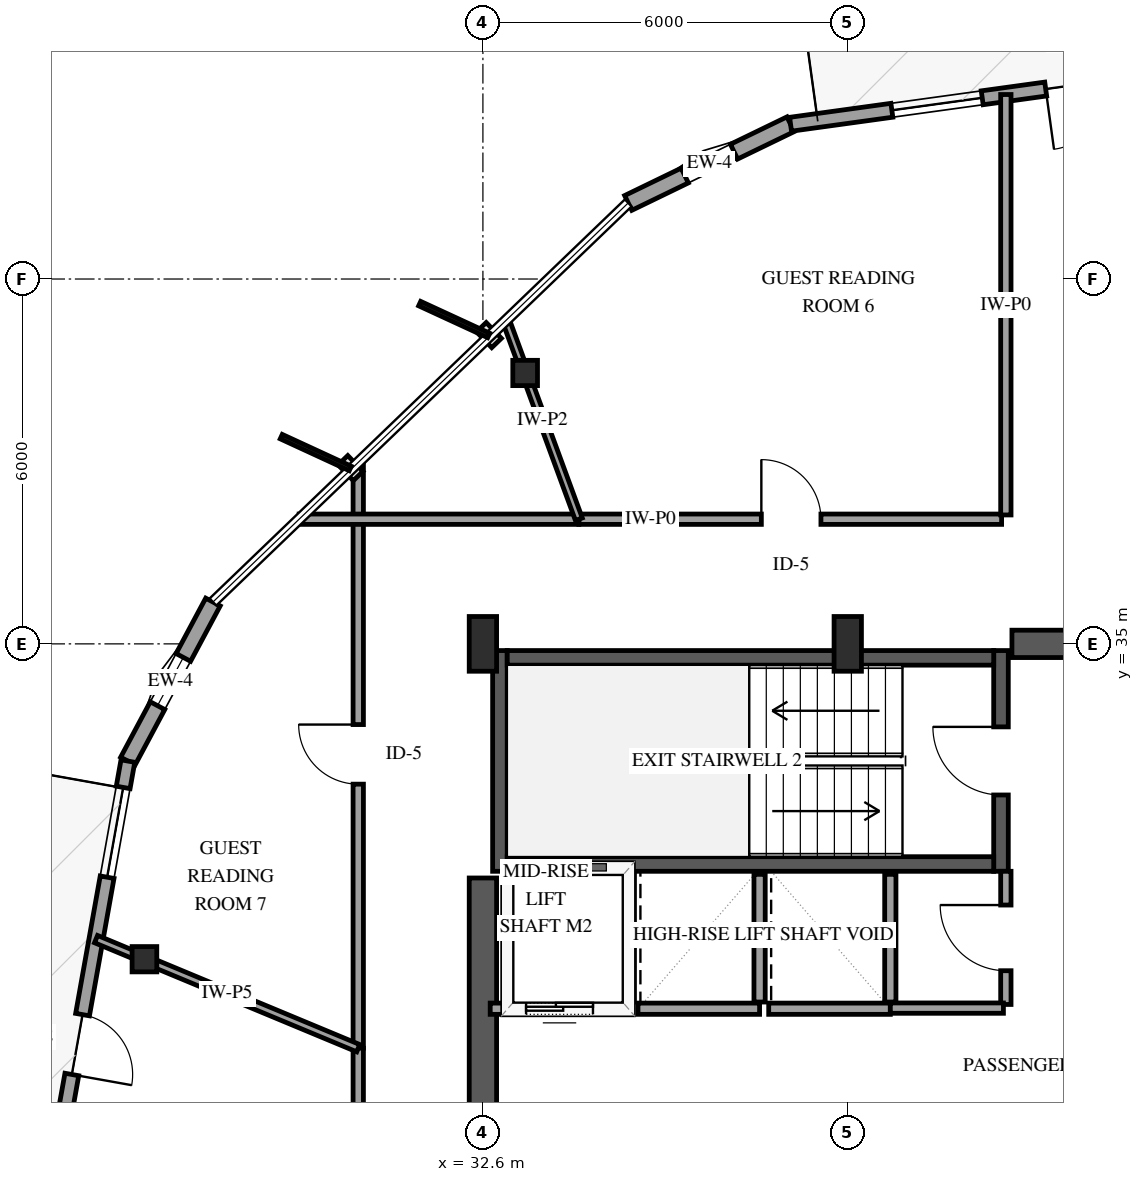
"""IFC4 building model, lengths in metres.
Left out: names, types, materials, properties, quantities, classifications, styles, units other than length and angle.
Written with IfcOpenShell. Run it as: python <this file> out.ifc"""

import sys

from ifc_helpers import new_model, si_unit, direction, frame, frame_2d, origin, origin_2d, place, context, subcontext, project, spatial, rectangle, i_section, extrude, element, fill, save


model = new_model("IFC4")
c1 = context("Model", 3, precision=1e-05, world=origin(), true_north=direction((0.0, 1.0)))
c2 = subcontext(c1, "Body", "Model", "MODEL_VIEW")
j1 = project(units=[si_unit("LENGTHUNIT", "METRE"), si_unit("PLANEANGLEUNIT", "RADIAN")], contexts=[c1])
p1 = place(None, origin())
s1 = spatial("IfcSite", under=j1, at=p1, CompositionType="ELEMENT")
p2 = place(p1, origin())
s2 = spatial("IfcBuilding", under=s1, at=p2, CompositionType="ELEMENT")
p3 = place(p2, frame((0.0, 0.0, 194.2)))
s3 = spatial("IfcBuildingStorey", under=s2, at=p3, CompositionType="ELEMENT", Elevation=194.2)
p4 = place(p3, frame((32.88, 31.26, 0.0), z_axis=(0.0, 0.0, 1.0), x_axis=(0.0, 1.0, 0.0)))
e1 = element("IfcWall", 1, at=p4, inside=s3, PredefinedType="SHEAR", context=c2, shape_type="SweptSolid", body=[
    extrude(rectangle(XDim=3.63, YDim=0.24, at=frame_2d((1.815, 0.0))), origin(), (0.0, 0.0, 1.0), 3.6),
])
p5 = place(p3, frame((41.12, 31.26, 0.0), z_axis=(0.0, 0.0, 1.0), x_axis=(0.0, 1.0, 0.0)))
e2 = element("IfcWall", 2, at=p5, inside=s3, PredefinedType="SHEAR", context=c2, shape_type="SweptSolid", body=[
    extrude(rectangle(XDim=3.63, YDim=0.24, at=frame_2d((1.815, 0.0))), origin(), (0.0, 0.0, 1.0), 3.6),
])
p6 = place(p5, frame((1.255, 0.0, 0.0)))
e3 = element("IfcOpeningElement", 3, at=p6, cuts=e2, PredefinedType="OPENING", context=c2, shape_type="SweptSolid", body=[
    extrude(rectangle(XDim=1.12, YDim=2.15, at=frame_2d((0.56, 1.075))), frame((0.0, 0.13, 0.0), z_axis=(0.0, -1.0, 0.0), x_axis=(1.0, 0.0, 0.0)), (0.0, 0.0, 1.0), 0.26),
])
for number, where, z_axis, x_axis in (
    (4, (33.0, 31.38, 0.0), (0.0, 0.0, 1.0), (1.0, 0.0, 0.0)),
    (5, (33.0, 34.77, 0.0), (0.0, 0.0, 1.0), (1.0, 0.0, 0.0)),
):
    element("IfcWall", number, at=place(p3, frame(where, z_axis=z_axis, x_axis=x_axis)), inside=s3, PredefinedType="SHEAR", context=c2, shape_type="SweptSolid", body=[
        extrude(rectangle(XDim=8.0, YDim=0.24, at=frame_2d((4.0, 0.0))), origin(), (0.0, 0.0, 1.0), 3.6),
    ])
p7 = place(p3, frame((32.6, 18.85, 0.0), z_axis=(0.0, 0.0, 1.0), x_axis=(0.0, 1.0, 0.0)))
e6 = element("IfcWall", 6, at=p7, inside=s3, PredefinedType="SHEAR", context=c2, shape_type="SweptSolid", body=[
    extrude(rectangle(XDim=12.3, YDim=0.45, at=frame_2d((6.15, 0.0))), origin(), (0.0, 0.0, 1.0), 3.6),
])
p8 = place(p3, frame((41.3, 35.0, 0.0), z_axis=(0.0, 0.0, 1.0), x_axis=(1.0, 0.0, 0.0)))
e7 = element("IfcWall", 7, at=p8, inside=s3, PredefinedType="SHEAR", context=c2, shape_type="SweptSolid", body=[
    extrude(rectangle(XDim=2.85, YDim=0.45, at=frame_2d((1.425, 0.0))), origin(), (0.0, 0.0, 1.0), 3.6),
])
for number, where, z_axis, x_axis in (
    (8, (32.6, 35.0, 0.0), (0.0, 0.0, 1.0), (1.0, 0.0, 0.0)),
    (9, (38.6, 35.0, 0.0), (0.0, 0.0, 1.0), (1.0, 0.0, 0.0)),
):
    element("IfcColumn", number, at=place(p3, frame(where, z_axis=z_axis, x_axis=x_axis)), inside=s3, PredefinedType="PILASTER", context=c2, shape_type="SweptSolid", body=[
        extrude(rectangle(XDim=0.45, YDim=0.9, at=origin_2d()), origin(), (0.0, 0.0, 1.0), 3.6),
    ])
for number, where, z_axis, x_axis in (
    (10, (33.295, 39.455, 0.0), (0.0, 0.0, 1.0), (1.0, 0.0, 0.0)),
    (11, (27.034, 29.814, 0.0), (0.0, 0.0, 1.0), (1.0, 0.0, 0.0)),
):
    element("IfcColumn", number, at=place(p3, frame(where, z_axis=z_axis, x_axis=x_axis)), inside=s3, PredefinedType="COLUMN", context=c2, shape_type="SweptSolid", body=[
        extrude(i_section(OverallWidth=0.406, OverallDepth=0.416, WebThickness=0.03, FlangeThickness=0.048, FilletRadius=0.038, at=origin_2d()), origin(), (0.0, 0.0, 1.0), 3.6),
    ])
p9 = place(p3, frame((37.659, 43.545, 0.0), z_axis=(0.0, 0.0, 1.0), x_axis=(-0.899889481121, -0.436118013578, 0.0)))
e12 = element("IfcWall", 12, at=p9, inside=s3, PredefinedType="SOLIDWALL", context=c2, shape_type="SweptSolid", body=[
    extrude(rectangle(XDim=2.966, YDim=0.27, at=frame_2d((1.483, 0.0))), origin(), (0.0, 0.0, 1.0), 2.679),
])
p10 = place(p9, frame((1.033, 0.0, 0.75)))
e13 = element("IfcOpeningElement", 13, at=p10, cuts=e12, PredefinedType="OPENING", context=c2, shape_type="SweptSolid", body=[
    extrude(rectangle(XDim=0.9, YDim=1.5, at=frame_2d((0.45, 0.75))), frame((0.0, 0.145, 0.0), z_axis=(0.0, -1.0, 0.0), x_axis=(1.0, 0.0, 0.0)), (0.0, 0.0, 1.0), 0.29),
])
p11 = place(p3, frame((47.042, 44.84, 0.0), z_axis=(0.0, 0.0, 1.0), x_axis=(-0.990605602179, -0.136749921142, 0.0)))
e14 = element("IfcWall", 14, at=p11, inside=s3, PredefinedType="SOLIDWALL", context=c2, shape_type="SweptSolid", body=[
    extrude(rectangle(XDim=9.471, YDim=0.23, at=frame_2d((4.735, 0.0))), origin(), (0.0, 0.0, 1.0), 2.679),
])
p12 = place(p11, frame((4.236, 0.0, 0.0)))
e15 = element("IfcOpeningElement", 15, at=p12, cuts=e14, PredefinedType="OPENING", context=c2, shape_type="SweptSolid", body=[
    extrude(rectangle(XDim=1.0, YDim=2.15, at=frame_2d((0.5, 1.075))), frame((0.0, 0.125, 0.0), z_axis=(0.0, -1.0, 0.0), x_axis=(1.0, 0.0, 0.0)), (0.0, 0.0, 1.0), 0.25),
])
p13 = place(p11, frame((0.44, 0.0, 0.72)))
e16 = element("IfcOpeningElement", 16, at=p13, cuts=e14, PredefinedType="OPENING", context=c2, shape_type="SweptSolid", body=[
    extrude(rectangle(XDim=1.5, YDim=1.7, at=frame_2d((0.75, 0.85))), frame((0.0, 0.125, 0.0), z_axis=(0.0, -1.0, 0.0), x_axis=(1.0, 0.0, 0.0)), (0.0, 0.0, 1.0), 0.25),
])
p14 = place(p11, frame((6.29, 0.0, 0.72)))
e17 = element("IfcOpeningElement", 17, at=p14, cuts=e14, PredefinedType="OPENING", context=c2, shape_type="SweptSolid", body=[
    extrude(rectangle(XDim=1.5, YDim=1.7, at=frame_2d((0.75, 0.85))), frame((0.0, 0.125, 0.0), z_axis=(0.0, -1.0, 0.0), x_axis=(1.0, 0.0, 0.0)), (0.0, 0.0, 1.0), 0.25),
])
p15 = place(p3, frame((28.161, 35.688, 0.0), z_axis=(0.0, 0.0, 1.0), x_axis=(-0.471634393059, -0.88179419327, 0.0)))
e18 = element("IfcWall", 18, at=p15, inside=s3, PredefinedType="SOLIDWALL", context=c2, shape_type="SweptSolid", body=[
    extrude(rectangle(XDim=2.967, YDim=0.27, at=frame_2d((1.483, 0.0))), origin(), (0.0, 0.0, 1.0), 2.679),
])
p16 = place(p15, frame((1.033, 0.0, 0.75)))
e19 = element("IfcOpeningElement", 19, at=p16, cuts=e18, PredefinedType="OPENING", context=c2, shape_type="SweptSolid", body=[
    extrude(rectangle(XDim=0.9, YDim=1.5, at=frame_2d((0.45, 0.75))), frame((0.0, 0.145, 0.0), z_axis=(0.0, -1.0, 0.0), x_axis=(1.0, 0.0, 0.0)), (0.0, 0.0, 1.0), 0.29),
])
p17 = place(p3, frame((26.762, 33.073, 0.0), z_axis=(0.0, 0.0, 1.0), x_axis=(-0.176062749049, -0.984378945527, 0.0)))
e20 = element("IfcWall", 20, at=p17, inside=s3, PredefinedType="SOLIDWALL", context=c2, shape_type="SweptSolid", body=[
    extrude(rectangle(XDim=9.471, YDim=0.23, at=frame_2d((4.735, 0.0))), origin(), (0.0, 0.0, 1.0), 2.679),
])
p18 = place(p17, frame((4.236, 0.0, 0.0)))
e21 = element("IfcOpeningElement", 21, at=p18, cuts=e20, PredefinedType="OPENING", context=c2, shape_type="SweptSolid", body=[
    extrude(rectangle(XDim=1.0, YDim=2.15, at=frame_2d((0.5, 1.075))), frame((0.0, 0.125, 0.0), z_axis=(0.0, -1.0, 0.0), x_axis=(1.0, 0.0, 0.0)), (0.0, 0.0, 1.0), 0.25),
])
p19 = place(p17, frame((0.44, 0.0, 0.72)))
e22 = element("IfcOpeningElement", 22, at=p19, cuts=e20, PredefinedType="OPENING", context=c2, shape_type="SweptSolid", body=[
    extrude(rectangle(XDim=1.5, YDim=1.7, at=frame_2d((0.75, 0.85))), frame((0.0, 0.125, 0.0), z_axis=(0.0, -1.0, 0.0), x_axis=(1.0, 0.0, 0.0)), (0.0, 0.0, 1.0), 0.25),
])
p20 = place(p17, frame((5.875, 0.0, 0.72)))
e23 = element("IfcOpeningElement", 23, at=p20, cuts=e20, PredefinedType="OPENING", context=c2, shape_type="SweptSolid", body=[
    extrude(rectangle(XDim=1.5, YDim=1.7, at=frame_2d((0.75, 0.85))), frame((0.0, 0.125, 0.0), z_axis=(0.0, -1.0, 0.0), x_axis=(1.0, 0.0, 0.0)), (0.0, 0.0, 1.0), 0.25),
])
p21 = place(p3, frame((32.72, 29.0, 0.0), z_axis=(0.0, 0.0, 1.0), x_axis=(1.0, 0.0, 0.0)))
e24 = element("IfcWall", 24, at=p21, inside=s3, PredefinedType="SOLIDWALL", context=c2, shape_type="SweptSolid", body=[
    extrude(rectangle(XDim=2.28, YDim=0.185, at=frame_2d((1.14, 0.0))), origin(), (0.0, 0.0, 1.0), 3.3),
])
p22 = place(p21, frame((0.59, 0.0, 0.0)))
e25 = element("IfcOpeningElement", 25, at=p22, cuts=e24, PredefinedType="OPENING", context=c2, shape_type="SweptSolid", body=[
    extrude(rectangle(XDim=1.1, YDim=2.15, at=frame_2d((0.55, 1.075))), frame((0.0, 0.103, 0.0), z_axis=(0.0, -1.0, 0.0), x_axis=(1.0, 0.0, 0.0)), (0.0, 0.0, 1.0), 0.205),
])
p23 = place(p3, frame((35.0, 29.11, 0.0), z_axis=(0.0, 0.0, 1.0), x_axis=(0.0, 1.0, 0.0)))
e26 = element("IfcWall", 26, at=p23, inside=s3, PredefinedType="SOLIDWALL", context=c2, shape_type="SweptSolid", body=[
    extrude(rectangle(XDim=2.1, YDim=0.185, at=frame_2d((1.05, 0.0))), origin(), (0.0, 0.0, 1.0), 3.3),
])
p24 = place(p3, frame((35.15, 29.0, 0.0), z_axis=(0.0, 0.0, 1.0), x_axis=(1.0, 0.0, 0.0)))
e27 = element("IfcWall", 27, at=p24, inside=s3, PredefinedType="SOLIDWALL", context=c2, shape_type="SweptSolid", body=[
    extrude(rectangle(XDim=2.0, YDim=0.185, at=frame_2d((1.0, 0.0))), origin(), (0.0, 0.0, 1.0), 3.3),
])
p25 = place(p3, frame((37.15, 29.11, 0.0), z_axis=(0.0, 0.0, 1.0), x_axis=(0.0, 1.0, 0.0)))
e28 = element("IfcWall", 28, at=p25, inside=s3, PredefinedType="SOLIDWALL", context=c2, shape_type="SweptSolid", body=[
    extrude(rectangle(XDim=2.1, YDim=0.185, at=frame_2d((1.05, 0.0))), origin(), (0.0, 0.0, 1.0), 3.3),
])
p26 = place(p3, frame((37.3, 29.0, 0.0), z_axis=(0.0, 0.0, 1.0), x_axis=(1.0, 0.0, 0.0)))
e29 = element("IfcWall", 29, at=p26, inside=s3, PredefinedType="SOLIDWALL", context=c2, shape_type="SweptSolid", body=[
    extrude(rectangle(XDim=2.0, YDim=0.185, at=frame_2d((1.0, 0.0))), origin(), (0.0, 0.0, 1.0), 3.3),
])
p27 = place(p3, frame((39.3, 29.11, 0.0), z_axis=(0.0, 0.0, 1.0), x_axis=(0.0, 1.0, 0.0)))
e30 = element("IfcWall", 30, at=p27, inside=s3, PredefinedType="SOLIDWALL", context=c2, shape_type="SweptSolid", body=[
    extrude(rectangle(XDim=2.1, YDim=0.185, at=frame_2d((1.05, 0.0))), origin(), (0.0, 0.0, 1.0), 3.3),
])
p28 = place(p3, frame((30.55, 28.351, 0.0), z_axis=(0.0, 0.0, 1.0), x_axis=(0.0, 1.0, 0.0)))
e31 = element("IfcWall", 31, at=p28, inside=s3, PredefinedType="PARTITIONING", context=c2, shape_type="SweptSolid", body=[
    extrude(rectangle(XDim=9.633, YDim=0.17, at=frame_2d((4.816, 0.0))), origin(), (0.0, 0.0, 1.0), 3.3),
])
p29 = place(p28, frame((4.342, 0.0, 0.0)))
e32 = element("IfcOpeningElement", 32, at=p29, cuts=e31, PredefinedType="OPENING", context=c2, shape_type="SweptSolid", body=[
    extrude(rectangle(XDim=0.98, YDim=2.15, at=frame_2d((0.49, 1.075))), frame((0.0, 0.095, 0.0), z_axis=(0.0, -1.0, 0.0), x_axis=(1.0, 0.0, 0.0)), (0.0, 0.0, 1.0), 0.19),
])
p30 = place(p3, frame((30.55, 20.106, 0.0), z_axis=(0.0, 0.0, 1.0), x_axis=(0.0, 1.0, 0.0)))
e33 = element("IfcWall", 33, at=p30, inside=s3, PredefinedType="PARTITIONING", context=c2, shape_type="SweptSolid", body=[
    extrude(rectangle(XDim=8.245, YDim=0.17, at=frame_2d((4.123, 0.0))), origin(), (0.0, 0.0, 1.0), 3.3),
])
p31 = place(p30, frame((3.647, 0.0, 0.0)))
e34 = element("IfcOpeningElement", 34, at=p31, cuts=e33, PredefinedType="OPENING", context=c2, shape_type="SweptSolid", body=[
    extrude(rectangle(XDim=0.98, YDim=2.15, at=frame_2d((0.49, 1.075))), frame((0.0, 0.095, 0.0), z_axis=(0.0, -1.0, 0.0), x_axis=(1.0, 0.0, 0.0)), (0.0, 0.0, 1.0), 0.19),
])
p32 = place(p3, frame((34.178, 37.05, 0.0), z_axis=(0.0, 0.0, 1.0), x_axis=(1.0, 0.0, 0.0)))
e35 = element("IfcWall", 35, at=p32, inside=s3, PredefinedType="PARTITIONING", context=c2, shape_type="SweptSolid", body=[
    extrude(rectangle(XDim=6.952, YDim=0.17, at=frame_2d((3.476, 0.0))), origin(), (0.0, 0.0, 1.0), 3.3),
])
p33 = place(p32, frame((3.001, 0.0, 0.0)))
e36 = element("IfcOpeningElement", 36, at=p33, cuts=e35, PredefinedType="OPENING", context=c2, shape_type="SweptSolid", body=[
    extrude(rectangle(XDim=0.98, YDim=2.15, at=frame_2d((0.49, 1.075))), frame((0.0, 0.095, 0.0), z_axis=(0.0, -1.0, 0.0), x_axis=(1.0, 0.0, 0.0)), (0.0, 0.0, 1.0), 0.19),
])
p34 = place(p3, frame((41.2, 37.12, 0.0), z_axis=(0.0, 0.0, 1.0), x_axis=(0.0, 1.0, 0.0)))
e37 = element("IfcWall", 37, at=p34, inside=s3, PredefinedType="PARTITIONING", context=c2, shape_type="SweptSolid", body=[
    extrude(rectangle(XDim=6.914, YDim=0.17, at=frame_2d((3.457, 0.0))), origin(), (0.0, 0.0, 1.0), 3.3),
])
p35 = place(p3, frame((30.55, 28.351, 0.0), z_axis=(0.0, 0.0, 1.0), x_axis=(-0.923284033824, 0.384117941374, 0.0)))
e38 = element("IfcWall", 38, at=p35, inside=s3, PredefinedType="PARTITIONING", context=c2, shape_type="SweptSolid", body=[
    extrude(rectangle(XDim=4.67, YDim=0.13, at=frame_2d((2.335, 0.0))), origin(), (0.0, 0.0, 1.0), 3.3),
])
p36 = place(p3, frame((29.578, 37.05, 0.0), z_axis=(0.0, 0.0, 1.0), x_axis=(1.0, 0.0, 0.0)))
e39 = element("IfcWall", 39, at=p36, inside=s3, PredefinedType="PARTITIONING", context=c2, shape_type="SweptSolid", body=[
    extrude(rectangle(XDim=4.6, YDim=0.17, at=frame_2d((2.3, 0.0))), origin(), (0.0, 0.0, 1.0), 3.3),
])
p37 = place(p3, frame((34.178, 37.05, 0.0), z_axis=(0.0, 0.0, 1.0), x_axis=(-0.344674965475, 0.938722093154, 0.0)))
e40 = element("IfcWall", 40, at=p37, inside=s3, PredefinedType="PARTITIONING", context=c2, shape_type="SweptSolid", body=[
    extrude(rectangle(XDim=3.481, YDim=0.12, at=frame_2d((1.741, 0.0))), origin(), (0.0, 0.0, 1.0), 2.595),
])
p38 = place(p3, frame((41.2, 29.07, 0.0), z_axis=(0.0, 0.0, 1.0), x_axis=(0.0, 1.0, 0.0)))
e41 = element("IfcWall", 41, at=p38, inside=s3, PredefinedType="PARTITIONING", context=c2, shape_type="SweptSolid", body=[
    extrude(rectangle(XDim=2.19, YDim=0.17, at=frame_2d((1.095, 0.0))), origin(), (0.0, 0.0, 1.0), 3.3),
])
p39 = place(p38, frame((0.555, 0.0, 0.0)))
e42 = element("IfcOpeningElement", 42, at=p39, cuts=e41, PredefinedType="OPENING", context=c2, shape_type="SweptSolid", body=[
    extrude(rectangle(XDim=1.08, YDim=2.15, at=frame_2d((0.54, 1.075))), frame((0.0, 0.095, 0.0), z_axis=(0.0, -1.0, 0.0), x_axis=(1.0, 0.0, 0.0)), (0.0, 0.0, 1.0), 0.19),
])
p40 = place(p3, frame((39.3, 29.01, 0.0), z_axis=(0.0, 0.0, 1.0), x_axis=(1.0, 0.0, 0.0)))
e43 = element("IfcWall", 43, at=p40, inside=s3, PredefinedType="PARTITIONING", context=c2, shape_type="SweptSolid", body=[
    extrude(rectangle(XDim=1.86, YDim=0.17, at=frame_2d((0.93, 0.0))), origin(), (0.0, 0.0, 1.0), 3.3),
])
p41 = place(p10, origin())
e44 = element("IfcWindow", 44, at=p41, inside=s3, PartitioningType="SINGLE_PANEL", PredefinedType="WINDOW", context=c2, shape_type="SweptSolid", body=[
    extrude(rectangle(XDim=0.9, YDim=1.5, at=frame_2d((0.45, 0.75))), frame((0.0, 0.03, 0.0), z_axis=(0.0, -1.0, 0.0), x_axis=(1.0, 0.0, 0.0)), (0.0, 0.0, 1.0), 0.06),
])
fill(e13, e44)
p42 = place(p12, origin())
e45 = element("IfcDoor", 45, at=p42, inside=s3, OperationType="SINGLE_SWING_RIGHT", PredefinedType="DOOR", context=c2, shape_type="SweptSolid", body=[
    extrude(rectangle(XDim=1.0, YDim=2.15, at=frame_2d((0.5, 1.075))), frame((0.0, 0.025, 0.0), z_axis=(0.0, -1.0, 0.0), x_axis=(1.0, 0.0, 0.0)), (0.0, 0.0, 1.0), 0.05),
])
fill(e15, e45)
p43 = place(p14, origin())
e46 = element("IfcWindow", 46, at=p43, inside=s3, PartitioningType="SINGLE_PANEL", PredefinedType="WINDOW", context=c2, shape_type="SweptSolid", body=[
    extrude(rectangle(XDim=1.5, YDim=1.7, at=frame_2d((0.75, 0.85))), frame((0.0, 0.03, 0.0), z_axis=(0.0, -1.0, 0.0), x_axis=(1.0, 0.0, 0.0)), (0.0, 0.0, 1.0), 0.06),
])
fill(e17, e46)
p44 = place(p16, origin())
e47 = element("IfcWindow", 47, at=p44, inside=s3, PartitioningType="SINGLE_PANEL", PredefinedType="WINDOW", context=c2, shape_type="SweptSolid", body=[
    extrude(rectangle(XDim=0.9, YDim=1.5, at=frame_2d((0.45, 0.75))), frame((0.0, 0.03, 0.0), z_axis=(0.0, -1.0, 0.0), x_axis=(1.0, 0.0, 0.0)), (0.0, 0.0, 1.0), 0.06),
])
fill(e19, e47)
p45 = place(p18, origin())
e48 = element("IfcDoor", 48, at=p45, inside=s3, OperationType="SINGLE_SWING_RIGHT", PredefinedType="DOOR", context=c2, shape_type="SweptSolid", body=[
    extrude(rectangle(XDim=1.0, YDim=2.15, at=frame_2d((0.5, 1.075))), frame((0.0, 0.025, 0.0), z_axis=(0.0, -1.0, 0.0), x_axis=(1.0, 0.0, 0.0)), (0.0, 0.0, 1.0), 0.05),
])
fill(e21, e48)
p46 = place(p19, origin())
e49 = element("IfcWindow", 49, at=p46, inside=s3, PartitioningType="SINGLE_PANEL", PredefinedType="WINDOW", context=c2, shape_type="SweptSolid", body=[
    extrude(rectangle(XDim=1.5, YDim=1.7, at=frame_2d((0.75, 0.85))), frame((0.0, 0.03, 0.0), z_axis=(0.0, -1.0, 0.0), x_axis=(1.0, 0.0, 0.0)), (0.0, 0.0, 1.0), 0.06),
])
fill(e22, e49)
p47 = place(p22, origin())
e50 = element("IfcDoor", 50, at=p47, inside=s3, OperationType="SLIDING_TO_LEFT", PredefinedType="DOOR", context=c2, shape_type="SweptSolid", body=[
    extrude(rectangle(XDim=1.1, YDim=2.15, at=frame_2d((0.55, 1.075))), frame((0.0, 0.025, 0.0), z_axis=(0.0, -1.0, 0.0), x_axis=(1.0, 0.0, 0.0)), (0.0, 0.0, 1.0), 0.05),
])
fill(e25, e50)
p48 = place(p6, origin())
e51 = element("IfcDoor", 51, at=p48, inside=s3, OperationType="SINGLE_SWING_RIGHT", PredefinedType="DOOR", context=c2, shape_type="SweptSolid", body=[
    extrude(rectangle(XDim=1.12, YDim=2.15, at=frame_2d((0.56, 1.075))), frame((0.0, 0.025, 0.0), z_axis=(0.0, -1.0, 0.0), x_axis=(1.0, 0.0, 0.0)), (0.0, 0.0, 1.0), 0.05),
])
fill(e3, e51)
p49 = place(p29, origin())
e52 = element("IfcDoor", 52, at=p49, inside=s3, OperationType="SINGLE_SWING_RIGHT", PredefinedType="DOOR", context=c2, shape_type="SweptSolid", body=[
    extrude(rectangle(XDim=0.98, YDim=2.15, at=frame_2d((0.49, 1.075))), frame((0.0, 0.025, 0.0), z_axis=(0.0, -1.0, 0.0), x_axis=(1.0, 0.0, 0.0)), (0.0, 0.0, 1.0), 0.05),
])
fill(e32, e52)
p50 = place(p33, origin())
e53 = element("IfcDoor", 53, at=p50, inside=s3, OperationType="SINGLE_SWING_LEFT", PredefinedType="DOOR", context=c2, shape_type="SweptSolid", body=[
    extrude(rectangle(XDim=0.98, YDim=2.15, at=frame_2d((0.49, 1.075))), frame((0.0, 0.025, 0.0), z_axis=(0.0, -1.0, 0.0), x_axis=(1.0, 0.0, 0.0)), (0.0, 0.0, 1.0), 0.05),
])
fill(e36, e53)
p51 = place(p39, origin())
e54 = element("IfcDoor", 54, at=p51, inside=s3, OperationType="SINGLE_SWING_RIGHT", PredefinedType="DOOR", context=c2, shape_type="SweptSolid", body=[
    extrude(rectangle(XDim=1.08, YDim=2.15, at=frame_2d((0.54, 1.075))), frame((0.0, 0.025, 0.0), z_axis=(0.0, -1.0, 0.0), x_axis=(1.0, 0.0, 0.0)), (0.0, 0.0, 1.0), 0.05),
])
fill(e42, e54)
save(model, sys.argv[1])
